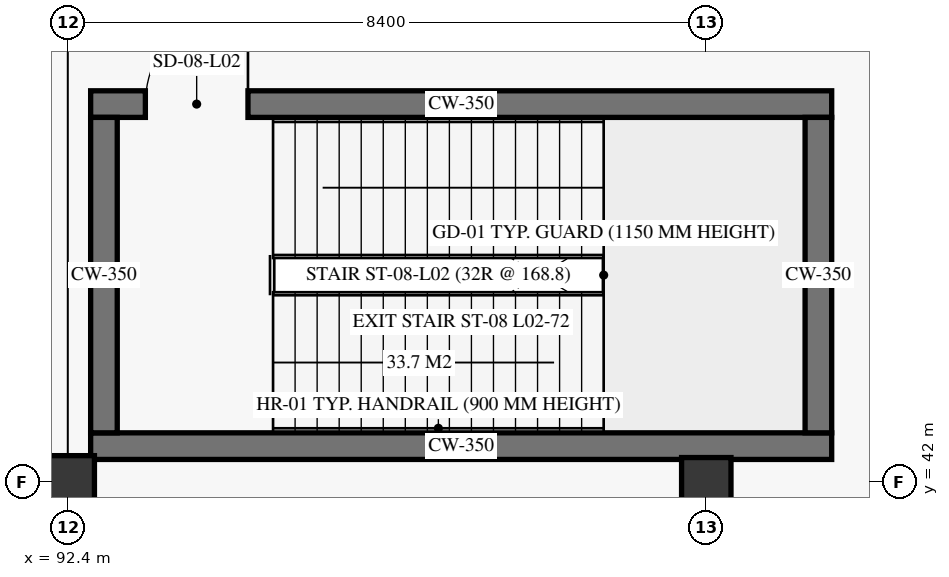
"""IFC4 building model, lengths in metres.
Left out: names, types, materials, properties, quantities, classifications, styles, units other than length and angle.
Written with IfcOpenShell. Run it as: python <this file> out.ifc"""

import sys

from ifc_helpers import new_model, si_unit, direction, frame, frame_2d, origin, origin_2d, place, context, subcontext, project, spatial, rectangle, extrude, element, fill, save


model = new_model("IFC4")
c1 = context("Model", 3, precision=1e-05, world=origin(), true_north=direction((0.0, 1.0)))
c2 = subcontext(c1, "Body", "Model", "MODEL_VIEW")
j1 = project(units=[si_unit("LENGTHUNIT", "METRE"), si_unit("PLANEANGLEUNIT", "RADIAN")], contexts=[c1])
p1 = place(None, origin())
s1 = spatial("IfcSite", under=j1, at=p1, CompositionType="ELEMENT")
p2 = place(p1, origin())
s2 = spatial("IfcBuilding", under=s1, at=p2, CompositionType="ELEMENT")
p3 = place(p2, frame((0.0, 0.0, 6.0)))
s3 = spatial("IfcBuildingStorey", under=s2, at=p3, CompositionType="ELEMENT", Elevation=6.0)
p4 = place(p3, frame((92.4, 42.0, 0.0), z_axis=(0.0, 0.0, 1.0), x_axis=(1.0, 0.0, 0.0)))
e1 = element("IfcColumn", 1, at=p4, inside=s3, PredefinedType="COLUMN", context=c2, shape_type="SweptSolid", body=[
    extrude(rectangle(XDim=0.7, YDim=0.7, at=origin_2d()), origin(), (0.0, 0.0, 1.0), 5.1),
])
p5 = place(p3, frame((100.8, 42.0, 0.0), z_axis=(0.0, 0.0, 1.0), x_axis=(1.0, 0.0, 0.0)))
e2 = element("IfcColumn", 2, at=p5, inside=s3, PredefinedType="COLUMN", context=c2, shape_type="SweptSolid", body=[
    extrude(rectangle(XDim=0.65, YDim=0.65, at=origin_2d()), origin(), (0.0, 0.0, 1.0), 5.1),
])
p6 = place(p3, frame((92.7, 42.475, 0.0), z_axis=(0.0, 0.0, 1.0), x_axis=(1.0, 0.0, 0.0)))
e3 = element("IfcWall", 3, at=p6, inside=s3, PredefinedType="SHEAR", context=c2, shape_type="SweptSolid", body=[
    extrude(rectangle(XDim=9.75, YDim=0.35, at=frame_2d((4.875, 0.0))), origin(), (0.0, 0.0, 1.0), 5.1),
])
p7 = place(p3, frame((92.7, 46.975, 0.0), z_axis=(0.0, 0.0, 1.0), x_axis=(1.0, 0.0, 0.0)))
e4 = element("IfcWall", 4, at=p7, inside=s3, PredefinedType="SHEAR", context=c2, shape_type="SweptSolid", body=[
    extrude(rectangle(XDim=9.75, YDim=0.35, at=frame_2d((4.875, 0.0))), origin(), (0.0, 0.0, 1.0), 5.1),
])
p8 = place(p7, frame((0.72, 0.0, 0.0)))
e5 = element("IfcOpeningElement", 5, at=p8, cuts=e4, PredefinedType="OPENING", context=c2, shape_type="SweptSolid", body=[
    extrude(rectangle(XDim=1.35, YDim=2.25, at=frame_2d((0.675, 1.125))), frame((0.0, 0.185, 0.0), z_axis=(0.0, -1.0, 0.0), x_axis=(1.0, 0.0, 0.0)), (0.0, 0.0, 1.0), 0.37),
])
for number, where, z_axis, x_axis in (
    (6, (92.875, 42.65, 0.0), (0.0, 0.0, 1.0), (0.0, 1.0, 0.0)),
    (7, (102.275, 42.65, 0.0), (0.0, 0.0, 1.0), (0.0, 1.0, 0.0)),
):
    element("IfcWall", number, at=place(p3, frame(where, z_axis=z_axis, x_axis=x_axis)), inside=s3, PredefinedType="SHEAR", context=c2, shape_type="SweptSolid", body=[
        extrude(rectangle(XDim=4.15, YDim=0.35, at=frame_2d((2.075, 0.0))), origin(), (0.0, 0.0, 1.0), 5.1),
    ])
p9 = place(p8, origin())
e8 = element("IfcDoor", 8, at=p9, inside=s3, OperationType="SINGLE_SWING_RIGHT", PredefinedType="DOOR", context=c2, shape_type="SweptSolid", body=[
    extrude(rectangle(XDim=1.35, YDim=2.25, at=frame_2d((0.675, 1.125))), frame((0.0, 0.025, 0.0), z_axis=(0.0, -1.0, 0.0), x_axis=(1.0, 0.0, 0.0)), (0.0, 0.0, 1.0), 0.05),
])
fill(e5, e8)
save(model, sys.argv[1])
